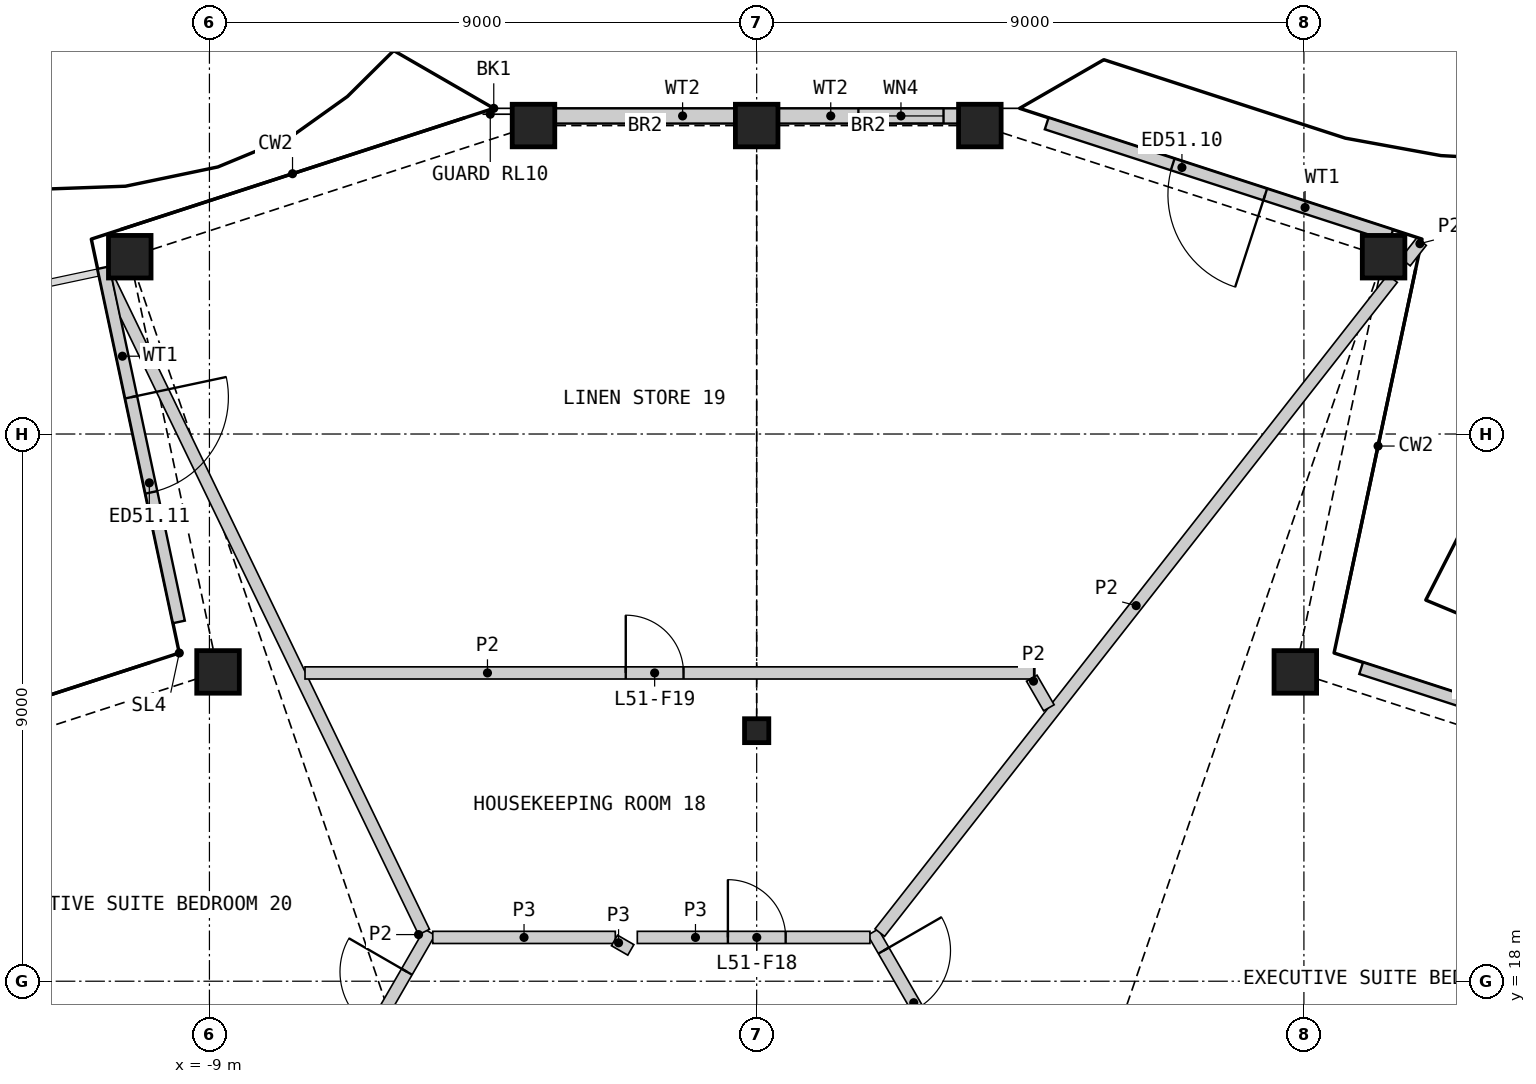
"""IFC4 building model, lengths in metres.
Left out: names, types, materials, properties, quantities, classifications, styles, units other than length and angle.
Written with IfcOpenShell. Run it as: python <this file> out.ifc"""

import sys

from ifc_helpers import new_model, si_unit, direction, frame, frame_2d, origin, origin_2d, place, context, subcontext, project, spatial, polyline, rectangle, hollow_rectangle, i_section, outline, extrude, element, fill, save


model = new_model("IFC4")
c1 = context("Model", 3, precision=1e-05, world=origin(), true_north=direction((0.0, 1.0)))
c2 = subcontext(c1, "Body", "Model", "MODEL_VIEW")
j1 = project(units=[si_unit("LENGTHUNIT", "METRE"), si_unit("PLANEANGLEUNIT", "RADIAN")], contexts=[c1])
p1 = place(None, origin())
s1 = spatial("IfcSite", under=j1, at=p1, CompositionType="ELEMENT")
p2 = place(p1, origin())
s2 = spatial("IfcBuilding", under=s1, at=p2, CompositionType="ELEMENT")
p3 = place(p2, frame((0.0, 0.0, 234.6)))
s3 = spatial("IfcBuildingStorey", under=s2, at=p3, CompositionType="ELEMENT", Elevation=234.6)
for number, where, z_axis, x_axis in (
    (1, (8.859, 23.087, 0.0), (0.0, 0.0, 1.0), (1.0, 0.0, 0.0)),
    (2, (10.31, 29.916, 0.0), (0.0, 0.0, 1.0), (1.0, 0.0, 0.0)),
    (3, (3.67, 32.073, 0.0), (0.0, 0.0, 1.0), (1.0, 0.0, 0.0)),
    (4, (0.0, 32.073, 0.0), (0.0, 0.0, 1.0), (1.0, 0.0, 0.0)),
    (5, (-3.67, 32.073, 0.0), (0.0, 0.0, 1.0), (1.0, 0.0, 0.0)),
    (6, (-10.31, 29.916, 0.0), (0.0, 0.0, 1.0), (1.0, 0.0, 0.0)),
    (7, (-8.859, 23.087, 0.0), (0.0, 0.0, 1.0), (1.0, 0.0, 0.0)),
):
    element("IfcColumn", number, at=place(p3, frame(where, z_axis=z_axis, x_axis=x_axis)), inside=s3, PredefinedType="COLUMN", context=c2, shape_type="SweptSolid", body=[
        extrude(hollow_rectangle(XDim=0.7, YDim=0.7, WallThickness=0.045, at=origin_2d()), origin(), (0.0, 0.0, 1.0), 3.6),
    ])
p4 = place(p3, frame((0.0, 22.121, 0.0), z_axis=(0.0, 0.0, 1.0), x_axis=(1.0, 0.0, 0.0)))
e8 = element("IfcColumn", 8, at=p4, inside=s3, PredefinedType="COLUMN", context=c2, shape_type="SweptSolid", body=[
    extrude(i_section(OverallWidth=0.399, OverallDepth=0.393, WebThickness=0.023, FlangeThickness=0.037, at=origin_2d()), origin(), (0.0, 0.0, 1.0), 3.6),
])
p5 = place(p3, frame((15.607, 21.308, 0.0), z_axis=(0.0, 0.0, 1.0), x_axis=(-0.951065383831, 0.308989701572, 0.0)))
e9 = element("IfcWall", 9, at=p5, inside=s3, PredefinedType="SOLIDWALL", context=c2, shape_type="SweptSolid", body=[
    extrude(rectangle(XDim=5.958, YDim=0.2, at=frame_2d((2.979, 0.0))), origin(), (0.0, 0.0, 1.0), 2.701),
])
p6 = place(p5, frame((2.179, 0.0, 0.0)))
e10 = element("IfcOpeningElement", 10, at=p6, cuts=e9, PredefinedType="OPENING", context=c2, shape_type="SweptSolid", body=[
    extrude(rectangle(XDim=1.6, YDim=2.4, at=frame_2d((0.8, 1.2))), frame((0.0, 0.11, 0.0), z_axis=(0.0, -1.0, 0.0), x_axis=(1.0, 0.0, 0.0)), (0.0, 0.0, 1.0), 0.22),
])
p7 = place(p3, frame((10.435, 30.266, 0.0), z_axis=(0.0, 0.0, 1.0), x_axis=(-0.951061471046, 0.309001744805, 0.0)))
e11 = element("IfcWall", 11, at=p7, inside=s3, PredefinedType="SOLIDWALL", context=c2, shape_type="SweptSolid", body=[
    extrude(rectangle(XDim=5.957, YDim=0.2, at=frame_2d((2.979, 0.0))), origin(), (0.0, 0.0, 1.0), 2.701),
])
p8 = place(p7, frame((2.179, 0.0, 0.0)))
e12 = element("IfcOpeningElement", 12, at=p8, cuts=e11, PredefinedType="OPENING", context=c2, shape_type="SweptSolid", body=[
    extrude(rectangle(XDim=1.6, YDim=2.4, at=frame_2d((0.8, 1.2))), frame((0.0, 0.11, 0.0), z_axis=(0.0, -1.0, 0.0), x_axis=(1.0, 0.0, 0.0)), (0.0, 0.0, 1.0), 0.22),
])
p9 = place(p3, frame((3.823, 32.231, 0.0), z_axis=(0.0, 0.0, 1.0), x_axis=(-1.0, 0.0, 0.0)))
e13 = element("IfcWall", 13, at=p9, inside=s3, PredefinedType="SOLIDWALL", context=c2, shape_type="SweptSolid", body=[
    extrude(rectangle(XDim=3.473, YDim=0.25, at=frame_2d((1.736, 0.0))), origin(), (0.0, 0.0, 1.0), 2.701),
])
p10 = place(p9, frame((0.75, 0.0, 1.8)))
e14 = element("IfcOpeningElement", 14, at=p10, cuts=e13, PredefinedType="OPENING", context=c2, shape_type="SweptSolid", body=[
    extrude(rectangle(XDim=1.4, YDim=0.7, at=frame_2d((0.7, 0.35))), frame((0.0, 0.135, 0.0), z_axis=(0.0, -1.0, 0.0), x_axis=(1.0, 0.0, 0.0)), (0.0, 0.0, 1.0), 0.27),
])
p11 = place(p3, frame((-0.35, 32.231, 0.0), z_axis=(0.0, 0.0, 1.0), x_axis=(-1.0, 0.0, 0.0)))
e15 = element("IfcWall", 15, at=p11, inside=s3, PredefinedType="SOLIDWALL", context=c2, shape_type="SweptSolid", body=[
    extrude(rectangle(XDim=3.473, YDim=0.25, at=frame_2d((1.736, 0.0))), origin(), (0.0, 0.0, 1.0), 2.701),
])
p12 = place(p3, frame((-10.741, 29.737, 0.0), z_axis=(0.0, 0.0, 1.0), x_axis=(0.207891593624, -0.978151872308, 0.0)))
e16 = element("IfcWall", 16, at=p12, inside=s3, PredefinedType="SOLIDWALL", context=c2, shape_type="SweptSolid", body=[
    extrude(rectangle(XDim=5.958, YDim=0.2, at=frame_2d((2.979, 0.0))), origin(), (0.0, 0.0, 1.0), 2.701),
])
p13 = place(p12, frame((2.179, 0.0, 0.0)))
e17 = element("IfcOpeningElement", 17, at=p13, cuts=e16, PredefinedType="OPENING", context=c2, shape_type="SweptSolid", body=[
    extrude(rectangle(XDim=1.6, YDim=2.4, at=frame_2d((0.8, 1.2))), frame((0.0, 0.11, 0.0), z_axis=(0.0, -1.0, 0.0), x_axis=(1.0, 0.0, 0.0)), (0.0, 0.0, 1.0), 0.22),
])
p14 = place(p3, frame((-18.976, -4.747, 0.0), z_axis=(0.0, 0.0, 1.0), x_axis=(0.499999852422, 0.866025488988, 0.0)))
e18 = element("IfcWall", 18, at=p14, inside=s3, PredefinedType="PARTITIONING", context=c2, shape_type="SweptSolid", body=[
    extrude(rectangle(XDim=27.198, YDim=0.2, at=frame_2d((13.599, 0.0))), origin(), (0.0, 0.0, 1.0), 3.25),
])
p15 = place(p14, frame((25.346, 0.0, 0.0)))
e19 = element("IfcOpeningElement", 19, at=p15, cuts=e18, PredefinedType="OPENING", context=c2, shape_type="SweptSolid", body=[
    extrude(rectangle(XDim=1.1, YDim=2.1, at=frame_2d((0.55, 1.05))), frame((0.0, 0.11, 0.0), z_axis=(0.0, -1.0, 0.0), x_axis=(1.0, 0.0, 0.0)), (0.0, 0.0, 1.0), 0.22),
])
p16 = place(p14, frame((16.713, 0.0, 0.0)))
e20 = element("IfcOpeningElement", 20, at=p16, cuts=e18, PredefinedType="OPENING", context=c2, shape_type="SweptSolid", body=[
    extrude(rectangle(XDim=1.1, YDim=2.1, at=frame_2d((0.55, 1.05))), frame((0.0, 0.11, 0.0), z_axis=(0.0, -1.0, 0.0), x_axis=(1.0, 0.0, 0.0)), (0.0, 0.0, 1.0), 0.22),
])
p17 = place(p14, frame((0.35, 0.0, 0.0)))
e21 = element("IfcOpeningElement", 21, at=p17, cuts=e18, PredefinedType="OPENING", context=c2, shape_type="SweptSolid", body=[
    extrude(rectangle(XDim=1.1, YDim=2.1, at=frame_2d((0.55, 1.05))), frame((0.0, 0.11, 0.0), z_axis=(0.0, -1.0, 0.0), x_axis=(1.0, 0.0, 0.0)), (0.0, 0.0, 1.0), 0.22),
])
p18 = place(p3, frame((1.913, 18.807, 0.0), z_axis=(0.0, 0.0, 1.0), x_axis=(0.499984524817, -0.866034338201, 0.0)))
e22 = element("IfcWall", 22, at=p18, inside=s3, PredefinedType="PARTITIONING", context=c2, shape_type="SweptSolid", body=[
    extrude(rectangle(XDim=5.51, YDim=0.2, at=frame_2d((2.755, 0.0))), origin(), (0.0, 0.0, 1.0), 3.25),
])
p19 = place(p18, frame((0.35, 0.0, 0.0)))
e23 = element("IfcOpeningElement", 23, at=p19, cuts=e22, PredefinedType="OPENING", context=c2, shape_type="SweptSolid", body=[
    extrude(rectangle(XDim=1.1, YDim=2.1, at=frame_2d((0.55, 1.05))), frame((0.0, 0.11, 0.0), z_axis=(0.0, -1.0, 0.0), x_axis=(1.0, 0.0, 0.0)), (0.0, 0.0, 1.0), 0.22),
])
p20 = place(p3, frame((-1.963, 18.72, 0.0), z_axis=(0.0, 0.0, 1.0), x_axis=(1.0, 0.0, 0.0)))
e24 = element("IfcWall", 24, at=p20, inside=s3, PredefinedType="PARTITIONING", context=c2, shape_type="SweptSolid", body=[
    extrude(rectangle(XDim=3.826, YDim=0.2, at=frame_2d((1.913, 0.0))), origin(), (0.0, 0.0, 1.0), 3.25),
])
p21 = place(p20, frame((1.49, 0.0, 0.0)))
e25 = element("IfcOpeningElement", 25, at=p21, cuts=e24, PredefinedType="OPENING", context=c2, shape_type="SweptSolid", body=[
    extrude(rectangle(XDim=0.95, YDim=2.1, at=frame_2d((0.475, 1.05))), frame((0.0, 0.11, 0.0), z_axis=(0.0, -1.0, 0.0), x_axis=(1.0, 0.0, 0.0)), (0.0, 0.0, 1.0), 0.22),
])
p22 = place(p3, frame((-5.327, 18.72, 0.0), z_axis=(0.0, 0.0, 1.0), x_axis=(1.0, 0.0, 0.0)))
e26 = element("IfcWall", 26, at=p22, inside=s3, PredefinedType="PARTITIONING", context=c2, shape_type="SweptSolid", body=[
    extrude(rectangle(XDim=3.002, YDim=0.2, at=frame_2d((1.501, 0.0))), origin(), (0.0, 0.0, 1.0), 3.25),
])
p23 = place(p3, frame((-2.338, 18.67, 0.0), z_axis=(0.0, 0.0, 1.0), x_axis=(0.866054481515, -0.499949632511, 0.0)))
e27 = element("IfcWall", 27, at=p23, inside=s3, PredefinedType="PARTITIONING", context=c2, shape_type="SweptSolid", body=[
    extrude(rectangle(XDim=0.31, YDim=0.2, at=frame_2d((0.155, 0.0))), origin(), (0.0, 0.0, 1.0), 3.25),
])
p24 = place(p3, frame((2.025, 18.799, 0.0), z_axis=(0.0, 0.0, 1.0), x_axis=(0.616942368609, 0.787008331478, 0.0)))
e28 = element("IfcWall", 28, at=p24, inside=s3, PredefinedType="PARTITIONING", context=c2, shape_type="SweptSolid", body=[
    extrude(rectangle(XDim=13.668, YDim=0.2, at=frame_2d((6.834, 0.0))), origin(), (0.0, 0.0, 1.0), 2.404),
])
p25 = place(p3, origin())
e29 = element("IfcWall", 29, at=p25, inside=s3, PredefinedType="PARTITIONING", context=c2, shape_type="SweptSolid", body=[
    extrude(outline(polyline([(-5.561, 18.767), (-10.466, 28.923), (-10.64, 29.745), (-5.381, 18.854), (-5.561, 18.767)])), origin(), (0.0, 0.0, 1.0), 2.404),
])
p26 = place(p3, frame((-7.428, 23.071, 0.0), z_axis=(0.0, 0.0, 1.0), x_axis=(1.0, 0.0, 0.0)))
e30 = element("IfcWall", 30, at=p26, inside=s3, PredefinedType="PARTITIONING", context=c2, shape_type="SweptSolid", body=[
    extrude(rectangle(XDim=12.002, YDim=0.2, at=frame_2d((6.001, 0.0))), origin(), (0.0, 0.0, 1.0), 2.404),
])
p27 = place(p26, frame((5.275, 0.0, 0.0)))
e31 = element("IfcOpeningElement", 31, at=p27, cuts=e30, PredefinedType="OPENING", context=c2, shape_type="SweptSolid", body=[
    extrude(rectangle(XDim=0.95, YDim=2.1, at=frame_2d((0.475, 1.05))), frame((0.0, 0.11, 0.0), z_axis=(0.0, -1.0, 0.0), x_axis=(1.0, 0.0, 0.0)), (0.0, 0.0, 1.0), 0.22),
])
p28 = place(p3, frame((4.524, 22.984, 0.0), z_axis=(0.0, 0.0, 1.0), x_axis=(0.500248658738, -0.865881792989, 0.0)))
e32 = element("IfcWall", 32, at=p28, inside=s3, PredefinedType="PARTITIONING", context=c2, shape_type="SweptSolid", body=[
    extrude(rectangle(XDim=0.562, YDim=0.2, at=frame_2d((0.281, 0.0))), origin(), (0.0, 0.0, 1.0), 2.404),
])
p29 = place(p3, frame((10.67, 29.828, 0.0), z_axis=(0.0, 0.0, 1.0), x_axis=(0.617216179113, 0.786793612227, 0.0)))
e33 = element("IfcWall", 33, at=p29, inside=s3, PredefinedType="PARTITIONING", context=c2, shape_type="SweptSolid", body=[
    extrude(rectangle(XDim=0.427, YDim=0.2, at=frame_2d((0.214, 0.0))), origin(), (0.0, 0.0, 1.0), 2.404),
])
p30 = place(p8, origin())
e34 = element("IfcDoor", 34, at=p30, inside=s3, OperationType="DOUBLE_DOOR_SINGLE_SWING", PredefinedType="DOOR", context=c2, shape_type="SweptSolid", body=[
    extrude(rectangle(XDim=1.6, YDim=2.4, at=frame_2d((0.8, 1.2))), frame((0.0, 0.025, 0.0), z_axis=(0.0, -1.0, 0.0), x_axis=(1.0, 0.0, 0.0)), (0.0, 0.0, 1.0), 0.05),
])
fill(e12, e34)
p31 = place(p10, origin())
e35 = element("IfcWindow", 35, at=p31, inside=s3, PartitioningType="SINGLE_PANEL", PredefinedType="WINDOW", context=c2, shape_type="SweptSolid", body=[
    extrude(rectangle(XDim=1.4, YDim=0.7, at=frame_2d((0.7, 0.35))), frame((0.0, 0.03, 0.0), z_axis=(0.0, -1.0, 0.0), x_axis=(1.0, 0.0, 0.0)), (0.0, 0.0, 1.0), 0.06),
])
fill(e14, e35)
p32 = place(p13, origin())
e36 = element("IfcDoor", 36, at=p32, inside=s3, OperationType="DOUBLE_DOOR_SINGLE_SWING", PredefinedType="DOOR", context=c2, shape_type="SweptSolid", body=[
    extrude(rectangle(XDim=1.6, YDim=2.4, at=frame_2d((0.8, 1.2))), frame((0.0, 0.025, 0.0), z_axis=(0.0, -1.0, 0.0), x_axis=(1.0, 0.0, 0.0)), (0.0, 0.0, 1.0), 0.05),
])
fill(e17, e36)
p33 = place(p19, origin())
e37 = element("IfcDoor", 37, at=p33, inside=s3, OperationType="SINGLE_SWING_LEFT", PredefinedType="DOOR", context=c2, shape_type="SweptSolid", body=[
    extrude(rectangle(XDim=1.1, YDim=2.1, at=frame_2d((0.55, 1.05))), frame((0.0, 0.025, 0.0), z_axis=(0.0, -1.0, 0.0), x_axis=(1.0, 0.0, 0.0)), (0.0, 0.0, 1.0), 0.05),
])
fill(e23, e37)
p34 = place(p21, origin())
e38 = element("IfcDoor", 38, at=p34, inside=s3, OperationType="SINGLE_SWING_LEFT", PredefinedType="DOOR", context=c2, shape_type="SweptSolid", body=[
    extrude(rectangle(XDim=0.95, YDim=2.1, at=frame_2d((0.475, 1.05))), frame((0.0, 0.025, 0.0), z_axis=(0.0, -1.0, 0.0), x_axis=(1.0, 0.0, 0.0)), (0.0, 0.0, 1.0), 0.05),
])
fill(e25, e38)
p35 = place(p27, origin())
e39 = element("IfcDoor", 39, at=p35, inside=s3, OperationType="SINGLE_SWING_LEFT", PredefinedType="DOOR", context=c2, shape_type="SweptSolid", body=[
    extrude(rectangle(XDim=0.95, YDim=2.1, at=frame_2d((0.475, 1.05))), frame((0.0, 0.025, 0.0), z_axis=(0.0, -1.0, 0.0), x_axis=(1.0, 0.0, 0.0)), (0.0, 0.0, 1.0), 0.05),
])
fill(e31, e39)
p36 = place(p15, origin())
e40 = element("IfcDoor", 40, at=p36, inside=s3, OperationType="SINGLE_SWING_RIGHT", PredefinedType="DOOR", context=c2, shape_type="SweptSolid", body=[
    extrude(rectangle(XDim=1.1, YDim=2.1, at=frame_2d((0.55, 1.05))), frame((0.0, 0.025, 0.0), z_axis=(0.0, -1.0, 0.0), x_axis=(1.0, 0.0, 0.0)), (0.0, 0.0, 1.0), 0.05),
])
fill(e19, e40)
save(model, sys.argv[1])
